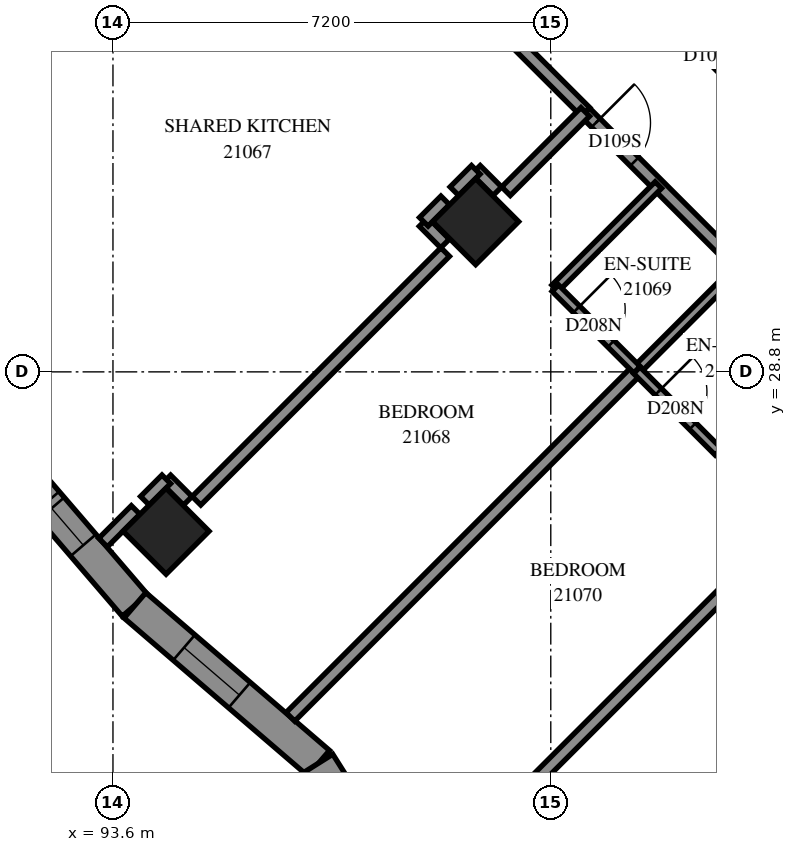
"""IFC4 building model, lengths in metres.
Left out: names, types, materials, properties, quantities, classifications, styles, units other than length and angle.
Written with IfcOpenShell. Run it as: python <this file> out.ifc"""

import sys

from ifc_helpers import new_model, si_unit, direction, frame, frame_2d, origin, origin_2d, place, context, subcontext, project, spatial, polyline, rectangle, outline, extrude, element, fill, save


model = new_model("IFC4")
c1 = context("Model", 3, precision=1e-05, world=origin(), true_north=direction((0.0, 1.0)))
c2 = subcontext(c1, "Body", "Model", "MODEL_VIEW")
j1 = project(units=[si_unit("LENGTHUNIT", "METRE"), si_unit("PLANEANGLEUNIT", "RADIAN")], contexts=[c1])
p1 = place(None, origin())
s1 = spatial("IfcSite", under=j1, at=p1, CompositionType="ELEMENT")
p2 = place(p1, origin())
s2 = spatial("IfcBuilding", under=s1, at=p2, CompositionType="ELEMENT")
p3 = place(p2, frame((0.0, 0.0, 81.2)))
s3 = spatial("IfcBuildingStorey", under=s2, at=p3, CompositionType="ELEMENT", Elevation=81.2)
for number, where, z_axis, x_axis in (
    (1, (99.565, 31.271, 0.0), (0.0, 0.0, 1.0), (0.707, -0.707, 0.0)),
    (2, (94.474, 26.18, 0.0), (0.0, 0.0, 1.0), (0.707, -0.707, 0.0)),
):
    element("IfcColumn", number, at=place(p3, frame(where, z_axis=z_axis, x_axis=x_axis)), inside=s3, PredefinedType="COLUMN", context=c2, shape_type="SweptSolid", body=[
        extrude(rectangle(XDim=1.0, YDim=1.0, at=origin_2d()), origin(), (0.0, 0.0, 1.0), 3.1),
    ])
p4 = place(p3, frame((91.38, 27.966, 0.0), z_axis=(0.0, 0.0, 1.0), x_axis=(0.6515352992, -0.758618319, 0.0)))
e3 = element("IfcWall", 3, at=p4, inside=s3, PredefinedType="SOLIDWALL", context=c2, shape_type="SweptSolid", body=[
    extrude(outline(polyline([(0.021, -0.275), (3.982, -0.275), (3.941, 0.275), (-0.021, 0.275), (0.021, -0.275)])), origin(), (0.0, 0.0, 1.0), 3.1),
])
p5 = place(p4, frame((0.43, 0.0, 0.5)))
e4 = element("IfcOpeningElement", 4, at=p5, cuts=e3, PredefinedType="OPENING", context=c2, shape_type="SweptSolid", body=[
    extrude(rectangle(XDim=1.3, YDim=2.45, at=frame_2d((0.65, 1.225))), frame((0.0, 0.285, 0.0), z_axis=(0.0, -1.0, 0.0), x_axis=(1.0, 0.0, 0.0)), (0.0, 0.0, 1.0), 0.57),
])
p6 = place(p4, frame((1.858, 0.0, 0.45)))
e5 = element("IfcOpeningElement", 5, at=p6, cuts=e3, PredefinedType="OPENING", context=c2, shape_type="SweptSolid", body=[
    extrude(rectangle(XDim=0.8, YDim=2.5, at=frame_2d((0.4, 1.25))), frame((0.0, 0.285, 0.0), z_axis=(0.0, -1.0, 0.0), x_axis=(1.0, 0.0, 0.0)), (0.0, 0.0, 1.0), 0.57),
])
p7 = place(p3, frame((93.961, 24.96, 0.0), z_axis=(0.0, 0.0, 1.0), x_axis=(0.7586163158, -0.6515376316, 0.0)))
e6 = element("IfcWall", 6, at=p7, inside=s3, PredefinedType="SOLIDWALL", context=c2, shape_type="SweptSolid", body=[
    extrude(outline(polyline([(-0.021, -0.275), (3.941, -0.275), (4.024, 0.275), (0.021, 0.275), (-0.021, -0.275)])), origin(), (0.0, 0.0, 1.0), 3.1),
])
p8 = place(p7, frame((1.065, 0.0, 0.5)))
e7 = element("IfcOpeningElement", 7, at=p8, cuts=e6, PredefinedType="OPENING", context=c2, shape_type="SweptSolid", body=[
    extrude(rectangle(XDim=1.2, YDim=2.45, at=frame_2d((0.6, 1.225))), frame((0.0, 0.285, 0.0), z_axis=(0.0, -1.0, 0.0), x_axis=(1.0, 0.0, 0.0)), (0.0, 0.0, 1.0), 0.57),
])
p9 = place(p3, frame((96.982, 22.366, 0.0), z_axis=(0.0, 0.0, 1.0), x_axis=(0.5323618976, -0.8465168693, 0.0)))
e8 = element("IfcWall", 8, at=p9, inside=s3, PredefinedType="SOLIDWALL", context=c2, shape_type="SweptSolid", body=[
    extrude(outline(polyline([(0.042, -0.275), (4.093, -0.275), (3.653, 0.275), (-0.042, 0.275), (0.042, -0.275)])), origin(), (0.0, 0.0, 1.0), 3.1),
])
p10 = place(p9, frame((0.9, 0.0, 0.5)))
e9 = element("IfcOpeningElement", 9, at=p10, cuts=e8, PredefinedType="OPENING", context=c2, shape_type="SweptSolid", body=[
    extrude(rectangle(XDim=1.2, YDim=2.45, at=frame_2d((0.6, 1.225))), frame((0.0, 0.285, 0.0), z_axis=(0.0, -1.0, 0.0), x_axis=(1.0, 0.0, 0.0)), (0.0, 0.0, 1.0), 0.57),
])
p11 = place(p3, frame((96.518, 23.127, 0.0), z_axis=(0.0, 0.0, 1.0), x_axis=(0.7069765458, 0.7072369926, 0.0)))
e10 = element("IfcWall", 10, at=p11, inside=s3, PredefinedType="PARTITIONING", context=c2, shape_type="SweptSolid", body=[
    extrude(rectangle(XDim=8.063, YDim=0.2, at=frame_2d((4.032, 0.0))), origin(), (0.0, 0.0, 1.0), 3.1),
])
p12 = place(p3, frame((101.365, 33.071, 0.0), z_axis=(0.0, 0.0, 1.0), x_axis=(0.7071067812, -0.7071067812, 0.0)))
e11 = element("IfcWall", 11, at=p12, inside=s3, PredefinedType="PARTITIONING", context=c2, shape_type="SweptSolid", body=[
    extrude(rectangle(XDim=7.2, YDim=0.2, at=frame_2d((3.6, 0.0))), origin(), (0.0, 0.0, 1.0), 3.1),
])
p13 = place(p12, frame((0.248, 0.0, 0.0)))
e12 = element("IfcOpeningElement", 12, at=p13, cuts=e11, PredefinedType="OPENING", context=c2, shape_type="SweptSolid", body=[
    extrude(rectangle(XDim=0.9, YDim=2.1, at=frame_2d((0.45, 1.05))), frame((0.0, 0.11, 0.0), z_axis=(0.0, -1.0, 0.0), x_axis=(1.0, 0.0, 0.0)), (0.0, 0.0, 1.0), 0.22),
])
p14 = place(p12, frame((5.95, 0.0, 0.0)))
e13 = element("IfcOpeningElement", 13, at=p14, cuts=e11, PredefinedType="OPENING", context=c2, shape_type="SweptSolid", body=[
    extrude(rectangle(XDim=0.9, YDim=2.1, at=frame_2d((0.45, 1.05))), frame((0.0, 0.11, 0.0), z_axis=(0.0, -1.0, 0.0), x_axis=(1.0, 0.0, 0.0)), (0.0, 0.0, 1.0), 0.22),
])
p15 = place(p3, frame((89.881, 31.771, 0.0), z_axis=(0.0, 0.0, 1.0), x_axis=(0.7071067812, 0.7071067812, 0.0)))
e14 = element("IfcWall", 14, at=p15, inside=s3, PredefinedType="PARTITIONING", context=c2, shape_type="SweptSolid", body=[
    extrude(rectangle(XDim=5.787, YDim=0.2, at=frame_2d((2.893, 0.0))), origin(), (0.0, 0.0, 1.0), 3.1),
])
p16 = place(p3, frame((100.063, 21.589, 0.0), z_axis=(0.0, 0.0, 1.0), x_axis=(0.7071067812, 0.7071067812, 0.0)))
e15 = element("IfcWall", 15, at=p16, inside=s3, PredefinedType="PARTITIONING", context=c2, shape_type="SweptSolid", body=[
    extrude(rectangle(XDim=5.787, YDim=0.2, at=frame_2d((2.893, 0.0))), origin(), (0.0, 0.0, 1.0), 2.6),
])
p17 = place(p3, frame((94.973, 26.681, 0.0), z_axis=(0.0, 0.0, 1.0), x_axis=(0.7071067812, 0.7071067812, 0.0)))
e16 = element("IfcWall", 16, at=p17, inside=s3, PredefinedType="PARTITIONING", context=c2, shape_type="SweptSolid", body=[
    extrude(rectangle(XDim=5.784, YDim=0.2, at=frame_2d((2.892, 0.0))), origin(), (0.0, 0.0, 1.0), 3.1),
])
p18 = place(p3, frame((98.469, 35.973, 0.0), z_axis=(0.0, 0.0, 1.0), x_axis=(0.7073506531, -0.7068628251, 0.0)))
e17 = element("IfcWall", 17, at=p18, inside=s3, PredefinedType="PARTITIONING", context=c2, shape_type="SweptSolid", body=[
    extrude(rectangle(XDim=4.1, YDim=0.2, at=frame_2d((2.05, 0.0))), origin(), (0.0, 0.0, 1.0), 3.1),
])
p19 = place(p18, frame((0.457, 0.0, 0.0)))
e18 = element("IfcOpeningElement", 18, at=p19, cuts=e17, PredefinedType="OPENING", context=c2, shape_type="SweptSolid", body=[
    extrude(rectangle(XDim=1.0, YDim=2.1, at=frame_2d((0.5, 1.05))), frame((0.0, 0.11, 0.0), z_axis=(0.0, -1.0, 0.0), x_axis=(1.0, 0.0, 0.0)), (0.0, 0.0, 1.0), 0.22),
])
p20 = place(p3, frame((100.871, 30.175, 0.0), z_axis=(0.0, 0.0, 1.0), x_axis=(0.7071067812, 0.7071067812, 0.0)))
e19 = element("IfcWall", 19, at=p20, inside=s3, PredefinedType="PARTITIONING", context=c2, shape_type="SweptSolid", body=[
    extrude(rectangle(XDim=2.401, YDim=0.15, at=frame_2d((1.201, 0.0))), origin(), (0.0, 0.0, 1.0), 3.1),
])
for number, where, z_axis, x_axis in (
    (20, (102.216, 28.832, 0.0), (0.0, 0.0, 1.0), (0.707, 0.707, 0.0)),
    (21, (103.559, 27.489, 0.0), (0.0, 0.0, 1.0), (0.707, 0.707, 0.0)),
):
    element("IfcWall", number, at=place(p3, frame(where, z_axis=z_axis, x_axis=x_axis)), inside=s3, PredefinedType="PARTITIONING", context=c2, shape_type="SweptSolid", body=[
        extrude(rectangle(XDim=2.398, YDim=0.15, at=frame_2d((1.199, 0.0))), origin(), (0.0, 0.0, 1.0), 3.1),
    ])
p21 = place(p3, frame((100.875, 30.177, 0.0), z_axis=(0.0, 0.0, 1.0), x_axis=(0.7076330979, -0.7065800724, 0.0)))
e22 = element("IfcWall", 22, at=p21, inside=s3, PredefinedType="PARTITIONING", context=c2, shape_type="SweptSolid", body=[
    extrude(rectangle(XDim=1.899, YDim=0.15, at=frame_2d((0.95, 0.0))), origin(), (0.0, 0.0, 1.0), 3.1),
])
p22 = place(p21, frame((0.493, 0.0, 0.0)))
e23 = element("IfcOpeningElement", 23, at=p22, cuts=e22, PredefinedType="OPENING", context=c2, shape_type="SweptSolid", body=[
    extrude(rectangle(XDim=0.8, YDim=2.1, at=frame_2d((0.4, 1.05))), frame((0.0, 0.085, 0.0), z_axis=(0.0, -1.0, 0.0), x_axis=(1.0, 0.0, 0.0)), (0.0, 0.0, 1.0), 0.17),
])
p23 = place(p3, frame((102.215, 28.826, 0.0), z_axis=(0.0, 0.0, 1.0), x_axis=(0.7071067812, -0.7071067812, 0.0)))
e24 = element("IfcWall", 24, at=p23, inside=s3, PredefinedType="PARTITIONING", context=c2, shape_type="SweptSolid", body=[
    extrude(rectangle(XDim=1.898, YDim=0.15, at=frame_2d((0.949, 0.0))), origin(), (0.0, 0.0, 1.0), 3.1),
])
p24 = place(p23, frame((0.5, 0.0, 0.0)))
e25 = element("IfcOpeningElement", 25, at=p24, cuts=e24, PredefinedType="OPENING", context=c2, shape_type="SweptSolid", body=[
    extrude(rectangle(XDim=0.8, YDim=2.1, at=frame_2d((0.4, 1.05))), frame((0.0, 0.085, 0.0), z_axis=(0.0, -1.0, 0.0), x_axis=(1.0, 0.0, 0.0)), (0.0, 0.0, 1.0), 0.17),
])
p25 = place(p3, frame((100.063, 31.771, 0.0), z_axis=(0.0, 0.0, 1.0), x_axis=(0.7071067812, 0.7071067812, 0.0)))
e26 = element("IfcWall", 26, at=p25, inside=s3, PredefinedType="PARTITIONING", context=c2, shape_type="SweptSolid", body=[
    extrude(rectangle(XDim=1.844, YDim=0.2, at=frame_2d((0.922, 0.0))), origin(), (0.0, 0.0, 1.0), 3.1),
])
p26 = place(p3, frame((102.857, 34.563, 0.0), z_axis=(0.0, 0.0, 1.0), x_axis=(0.7071067812, -0.7071067812, 0.0)))
e27 = element("IfcWall", 27, at=p26, inside=s3, PredefinedType="PARTITIONING", context=c2, shape_type="SweptSolid", body=[
    extrude(rectangle(XDim=1.7, YDim=0.2, at=frame_2d((0.85, 0.0))), origin(), (0.0, 0.0, 1.0), 3.1),
])
p27 = place(p26, frame((0.35, 0.0, 0.0)))
e28 = element("IfcOpeningElement", 28, at=p27, cuts=e27, PredefinedType="OPENING", context=c2, shape_type="SweptSolid", body=[
    extrude(rectangle(XDim=0.9, YDim=2.1, at=frame_2d((0.45, 1.05))), frame((0.0, 0.11, 0.0), z_axis=(0.0, -1.0, 0.0), x_axis=(1.0, 0.0, 0.0)), (0.0, 0.0, 1.0), 0.22),
])
p28 = place(p3, frame((93.437, 25.993, 0.0), z_axis=(0.0, 0.0, 1.0), x_axis=(0.7071067812, 0.7071067812, 0.0)))
e29 = element("IfcWall", 29, at=p28, inside=s3, PredefinedType="PARTITIONING", context=c2, shape_type="SweptSolid", body=[
    extrude(rectangle(XDim=0.758, YDim=0.2, at=frame_2d((0.379, 0.0))), origin(), (0.0, 0.0, 1.0), 3.1),
])
p29 = place(p3, frame((98.709, 31.265, 0.0), z_axis=(0.0, 0.0, 1.0), x_axis=(0.7051008166, -0.7091070712, 0.0)))
e30 = element("IfcWall", 30, at=p29, inside=s3, PredefinedType="PARTITIONING", context=c2, shape_type="SweptSolid", body=[
    extrude(rectangle(XDim=0.499, YDim=0.2, at=frame_2d((0.25, 0.0))), origin(), (0.0, 0.0, 1.0), 3.1),
])
for number, where, z_axis, x_axis in (
    (31, (99.569, 32.123, 0.0), (0.0, 0.0, 1.0), (0.707, -0.707, 0.0)),
    (32, (94.478, 27.032, 0.0), (0.0, 0.0, 1.0), (0.707, -0.707, 0.0)),
    (33, (94.125, 26.681, 0.0), (0.0, 0.0, 1.0), (0.707, 0.707, 0.0)),
    (34, (99.215, 31.771, 0.0), (0.0, 0.0, 1.0), (0.707, 0.707, 0.0)),
    (35, (98.712, 31.268, 0.0), (0.0, 0.0, 1.0), (0.707, 0.707, 0.0)),
):
    element("IfcWall", number, at=place(p3, frame(where, z_axis=z_axis, x_axis=x_axis)), inside=s3, PredefinedType="PARTITIONING", context=c2, shape_type="SweptSolid", body=[
        extrude(rectangle(XDim=0.498, YDim=0.2, at=frame_2d((0.249, 0.0))), origin(), (0.0, 0.0, 1.0), 3.1),
    ])
p30 = place(p5, origin())
e36 = element("IfcWindow", 36, at=p30, inside=s3, PartitioningType="SINGLE_PANEL", PredefinedType="WINDOW", context=c2, shape_type="SweptSolid", body=[
    extrude(rectangle(XDim=1.3, YDim=2.45, at=frame_2d((0.65, 1.225))), frame((0.0, 0.155, 0.0), z_axis=(0.0, -1.0, 0.0), x_axis=(1.0, 0.0, 0.0)), (0.0, 0.0, 1.0), 0.06),
])
fill(e4, e36)
p31 = place(p8, origin())
e37 = element("IfcWindow", 37, at=p31, inside=s3, PartitioningType="SINGLE_PANEL", PredefinedType="WINDOW", context=c2, shape_type="SweptSolid", body=[
    extrude(rectangle(XDim=1.2, YDim=2.45, at=frame_2d((0.6, 1.225))), frame((0.0, 0.155, 0.0), z_axis=(0.0, -1.0, 0.0), x_axis=(1.0, 0.0, 0.0)), (0.0, 0.0, 1.0), 0.06),
])
fill(e7, e37)
p32 = place(p27, origin())
e38 = element("IfcDoor", 38, at=p32, inside=s3, OperationType="SINGLE_SWING_LEFT", PredefinedType="DOOR", context=c2, shape_type="SweptSolid", body=[
    extrude(rectangle(XDim=0.9, YDim=2.1, at=frame_2d((0.45, 1.05))), frame((0.0, 0.025, 0.0), z_axis=(0.0, -1.0, 0.0), x_axis=(1.0, 0.0, 0.0)), (0.0, 0.0, 1.0), 0.05),
])
fill(e28, e38)
p33 = place(p13, origin())
e39 = element("IfcDoor", 39, at=p33, inside=s3, OperationType="SINGLE_SWING_RIGHT", PredefinedType="DOOR", context=c2, shape_type="SweptSolid", body=[
    extrude(rectangle(XDim=0.9, YDim=2.1, at=frame_2d((0.45, 1.05))), frame((0.0, 0.025, 0.0), z_axis=(0.0, -1.0, 0.0), x_axis=(1.0, 0.0, 0.0)), (0.0, 0.0, 1.0), 0.05),
])
fill(e12, e39)
p34 = place(p22, origin())
e40 = element("IfcDoor", 40, at=p34, inside=s3, OperationType="SINGLE_SWING_RIGHT", PredefinedType="DOOR", context=c2, shape_type="SweptSolid", body=[
    extrude(rectangle(XDim=0.8, YDim=2.1, at=frame_2d((0.4, 1.05))), frame((0.0, 0.025, 0.0), z_axis=(0.0, -1.0, 0.0), x_axis=(1.0, 0.0, 0.0)), (0.0, 0.0, 1.0), 0.05),
])
fill(e23, e40)
p35 = place(p24, origin())
e41 = element("IfcDoor", 41, at=p35, inside=s3, OperationType="SINGLE_SWING_RIGHT", PredefinedType="DOOR", context=c2, shape_type="SweptSolid", body=[
    extrude(rectangle(XDim=0.8, YDim=2.1, at=frame_2d((0.4, 1.05))), frame((0.0, 0.025, 0.0), z_axis=(0.0, -1.0, 0.0), x_axis=(1.0, 0.0, 0.0)), (0.0, 0.0, 1.0), 0.05),
])
fill(e25, e41)
p36 = place(p6, origin())
e42 = element("IfcWindow", 42, at=p36, inside=s3, PartitioningType="SINGLE_PANEL", PredefinedType="WINDOW", context=c2, shape_type="SweptSolid", body=[
    extrude(rectangle(XDim=0.8, YDim=2.5, at=frame_2d((0.4, 1.25))), frame((0.0, 0.155, 0.0), z_axis=(0.0, -1.0, 0.0), x_axis=(1.0, 0.0, 0.0)), (0.0, 0.0, 1.0), 0.06),
])
fill(e5, e42)
save(model, sys.argv[1])
